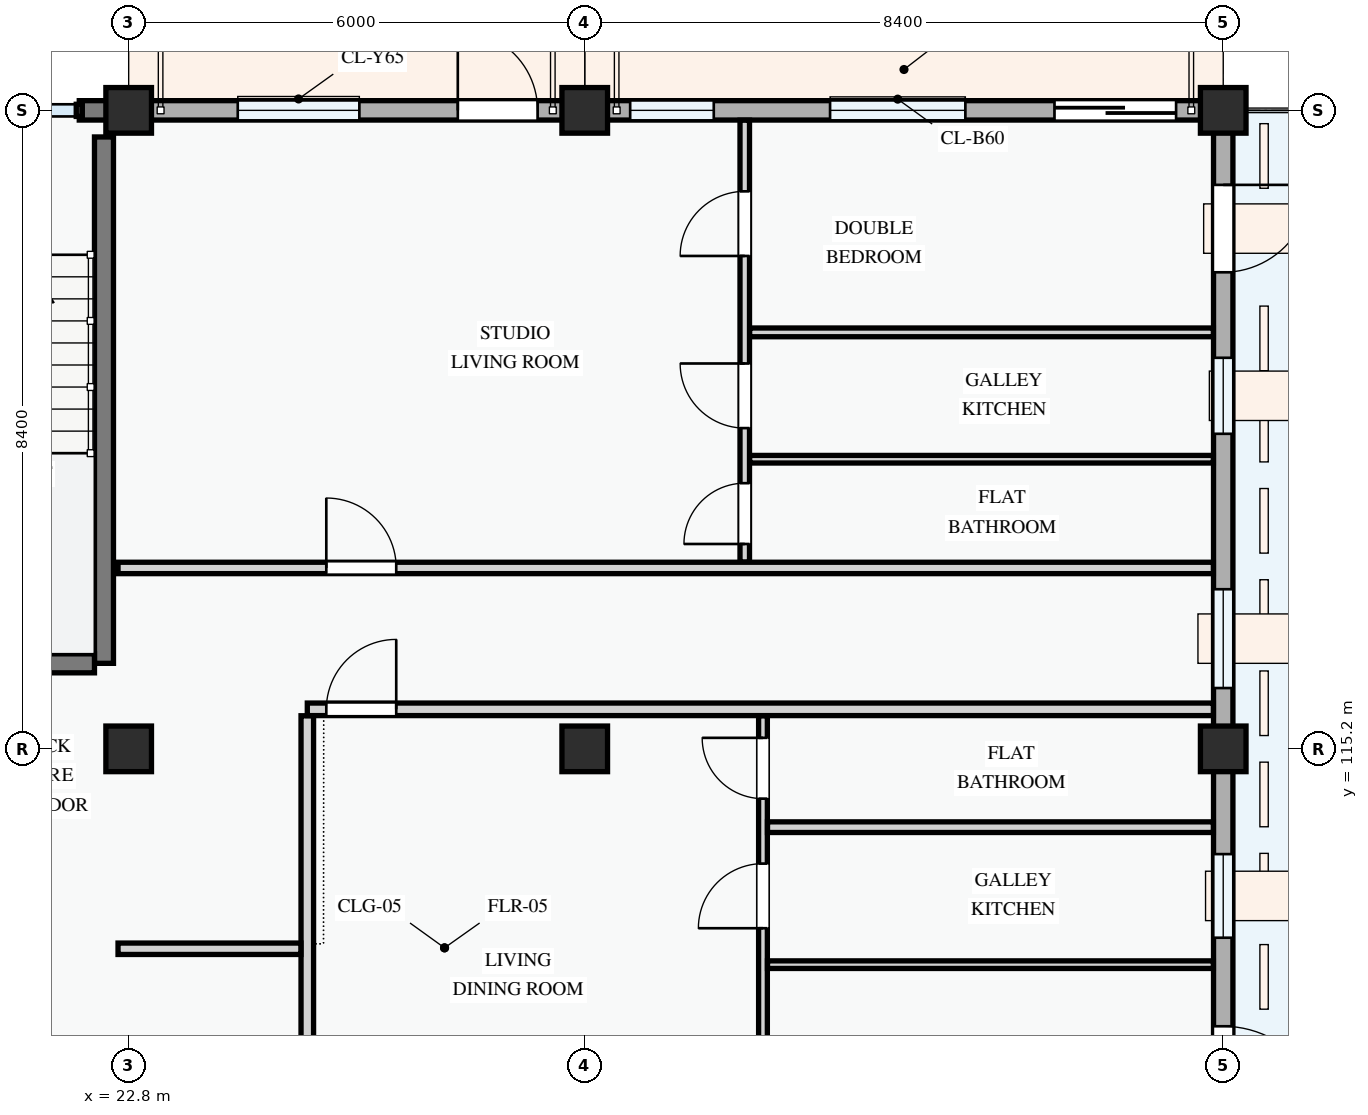
"""IFC4 building model, lengths in metres.
Left out: names, types, materials, properties, quantities, classifications, styles, units other than length and angle.
Written with IfcOpenShell. Run it as: python <this file> out.ifc"""

import sys

from ifc_helpers import new_model, si_unit, direction, frame, frame_2d, origin, origin_2d, place, context, subcontext, project, spatial, rectangle, extrude, element, fill, save


model = new_model("IFC4")
c1 = context("Model", 3, precision=1e-05, world=origin(), true_north=direction((0.0, 1.0)))
c2 = subcontext(c1, "Body", "Model", "MODEL_VIEW")
j1 = project(units=[si_unit("LENGTHUNIT", "METRE"), si_unit("PLANEANGLEUNIT", "RADIAN")], contexts=[c1])
p1 = place(None, origin())
s1 = spatial("IfcSite", under=j1, at=p1, CompositionType="ELEMENT")
p2 = place(p1, origin())
s2 = spatial("IfcBuilding", under=s1, at=p2, CompositionType="ELEMENT")
p3 = place(p2, frame((0.0, 0.0, 37.8)))
s3 = spatial("IfcBuildingStorey", under=s2, at=p3, CompositionType="ELEMENT", Elevation=37.8)
for number, where, z_axis, x_axis in (
    (1, (22.8, 115.2, 0.0), (0.0, 0.0, 1.0), (1.0, 0.0, 0.0)),
    (2, (22.8, 123.6, 0.0), (0.0, 0.0, 1.0), (1.0, 0.0, 0.0)),
    (3, (28.8, 115.2, 0.0), (0.0, 0.0, 1.0), (1.0, 0.0, 0.0)),
    (4, (28.8, 123.6, 0.0), (0.0, 0.0, 1.0), (1.0, 0.0, 0.0)),
    (5, (37.2, 115.2, 0.0), (0.0, 0.0, 1.0), (1.0, 0.0, 0.0)),
    (6, (37.2, 123.6, 0.0), (0.0, 0.0, 1.0), (1.0, 0.0, 0.0)),
):
    element("IfcColumn", number, at=place(p3, frame(where, z_axis=z_axis, x_axis=x_axis)), inside=s3, PredefinedType="COLUMN", context=c2, shape_type="SweptSolid", body=[
        extrude(rectangle(XDim=0.6, YDim=0.6, at=origin_2d()), origin(), (0.0, 0.0, 1.0), 3.3),
    ])
p4 = place(p3, frame((37.2, 109.2, 0.0), z_axis=(0.0, 0.0, 1.0), x_axis=(0.0, 1.0, 0.0)))
e7 = element("IfcWall", 7, at=p4, inside=s3, PredefinedType="STANDARD", context=c2, shape_type="SweptSolid", body=[
    extrude(rectangle(XDim=6.0, YDim=0.255, at=frame_2d((3.0, 0.0))), origin(), (0.0, 0.0, 1.0), 2.575),
])
p5 = place(p4, frame((1.0, 0.0, 0.0)))
e8 = element("IfcOpeningElement", 8, at=p5, cuts=e7, PredefinedType="OPENING", context=c2, shape_type="SweptSolid", body=[
    extrude(rectangle(XDim=1.35, YDim=2.2, at=frame_2d((0.675, 1.1))), frame((0.0, 0.137, 0.0), z_axis=(0.0, -1.0, 0.0), x_axis=(1.0, 0.0, 0.0)), (0.0, 0.0, 1.0), 0.275),
])
p6 = place(p4, frame((3.515, 0.0, 0.78)))
e9 = element("IfcOpeningElement", 9, at=p6, cuts=e7, PredefinedType="OPENING", context=c2, shape_type="SweptSolid", body=[
    extrude(rectangle(XDim=1.1, YDim=1.3, at=frame_2d((0.55, 0.65))), frame((0.0, 0.137, 0.0), z_axis=(0.0, -1.0, 0.0), x_axis=(1.0, 0.0, 0.0)), (0.0, 0.0, 1.0), 0.275),
])
p7 = place(p3, frame((37.2, 115.2, 0.0), z_axis=(0.0, 0.0, 1.0), x_axis=(0.0, 1.0, 0.0)))
e10 = element("IfcWall", 10, at=p7, inside=s3, PredefinedType="STANDARD", context=c2, shape_type="SweptSolid", body=[
    extrude(rectangle(XDim=8.4, YDim=0.255, at=frame_2d((4.2, 0.0))), origin(), (0.0, 0.0, 1.0), 2.425),
])
p8 = place(p7, frame((6.27, 0.0, 0.0)))
e11 = element("IfcOpeningElement", 11, at=p8, cuts=e10, PredefinedType="OPENING", context=c2, shape_type="SweptSolid", body=[
    extrude(rectangle(XDim=1.15, YDim=2.15, at=frame_2d((0.575, 1.075))), frame((0.0, 0.137, 0.0), z_axis=(0.0, -1.0, 0.0), x_axis=(1.0, 0.0, 0.0)), (0.0, 0.0, 1.0), 0.275),
])
p9 = place(p7, frame((0.8, 0.0, 0.78)))
e12 = element("IfcOpeningElement", 12, at=p9, cuts=e10, PredefinedType="OPENING", context=c2, shape_type="SweptSolid", body=[
    extrude(rectangle(XDim=1.3, YDim=1.4, at=frame_2d((0.65, 0.7))), frame((0.0, 0.137, 0.0), z_axis=(0.0, -1.0, 0.0), x_axis=(1.0, 0.0, 0.0)), (0.0, 0.0, 1.0), 0.275),
])
p10 = place(p7, frame((4.145, 0.0, 0.78)))
e13 = element("IfcOpeningElement", 13, at=p10, cuts=e10, PredefinedType="OPENING", context=c2, shape_type="SweptSolid", body=[
    extrude(rectangle(XDim=1.0, YDim=1.25, at=frame_2d((0.5, 0.625))), frame((0.0, 0.137, 0.0), z_axis=(0.0, -1.0, 0.0), x_axis=(1.0, 0.0, 0.0)), (0.0, 0.0, 1.0), 0.275),
])
p11 = place(p3, frame((37.2, 123.6, 0.0), z_axis=(0.0, 0.0, 1.0), x_axis=(-1.0, 0.0, 0.0)))
e14 = element("IfcWall", 14, at=p11, inside=s3, PredefinedType="STANDARD", context=c2, shape_type="SweptSolid", body=[
    extrude(rectangle(XDim=8.4, YDim=0.255, at=frame_2d((4.2, 0.0))), origin(), (0.0, 0.0, 1.0), 2.375),
])
p12 = place(p11, frame((0.62, 0.0, 0.0)))
e15 = element("IfcOpeningElement", 15, at=p12, cuts=e14, PredefinedType="OPENING", context=c2, shape_type="SweptSolid", body=[
    extrude(rectangle(XDim=1.6, YDim=2.2, at=frame_2d((0.8, 1.1))), frame((0.0, 0.137, 0.0), z_axis=(0.0, -1.0, 0.0), x_axis=(1.0, 0.0, 0.0)), (0.0, 0.0, 1.0), 0.275),
])
p13 = place(p11, frame((3.392, 0.0, 0.78)))
e16 = element("IfcOpeningElement", 16, at=p13, cuts=e14, PredefinedType="OPENING", context=c2, shape_type="SweptSolid", body=[
    extrude(rectangle(XDim=1.78, YDim=1.42, at=frame_2d((0.89, 0.71))), frame((0.0, 0.137, 0.0), z_axis=(0.0, -1.0, 0.0), x_axis=(1.0, 0.0, 0.0)), (0.0, 0.0, 1.0), 0.275),
])
p14 = place(p11, frame((6.702, 0.0, 0.78)))
e17 = element("IfcOpeningElement", 17, at=p14, cuts=e14, PredefinedType="OPENING", context=c2, shape_type="SweptSolid", body=[
    extrude(rectangle(XDim=1.1, YDim=1.3, at=frame_2d((0.55, 0.65))), frame((0.0, 0.137, 0.0), z_axis=(0.0, -1.0, 0.0), x_axis=(1.0, 0.0, 0.0)), (0.0, 0.0, 1.0), 0.275),
])
p15 = place(p3, frame((28.8, 123.6, 0.0), z_axis=(0.0, 0.0, 1.0), x_axis=(-1.0, 0.0, 0.0)))
e18 = element("IfcWall", 18, at=p15, inside=s3, PredefinedType="STANDARD", context=c2, shape_type="SweptSolid", body=[
    extrude(rectangle(XDim=6.0, YDim=0.255, at=frame_2d((3.0, 0.0))), origin(), (0.0, 0.0, 1.0), 2.525),
])
p16 = place(p15, frame((0.62, 0.0, 0.0)))
e19 = element("IfcOpeningElement", 19, at=p16, cuts=e18, PredefinedType="OPENING", context=c2, shape_type="SweptSolid", body=[
    extrude(rectangle(XDim=1.05, YDim=2.15, at=frame_2d((0.525, 1.075))), frame((0.0, 0.137, 0.0), z_axis=(0.0, -1.0, 0.0), x_axis=(1.0, 0.0, 0.0)), (0.0, 0.0, 1.0), 0.275),
])
p17 = place(p15, frame((2.965, 0.0, 0.78)))
e20 = element("IfcOpeningElement", 20, at=p17, cuts=e18, PredefinedType="OPENING", context=c2, shape_type="SweptSolid", body=[
    extrude(rectangle(XDim=1.6, YDim=1.55, at=frame_2d((0.8, 0.775))), frame((0.0, 0.137, 0.0), z_axis=(0.0, -1.0, 0.0), x_axis=(1.0, 0.0, 0.0)), (0.0, 0.0, 1.0), 0.275),
])
p18 = place(p3, frame((22.8, 123.6, 0.0), z_axis=(0.0, 0.0, 1.0), x_axis=(-1.0, 0.0, 0.0)))
e21 = element("IfcWall", 21, at=p18, inside=s3, PredefinedType="STANDARD", context=c2, shape_type="SweptSolid", body=[
    extrude(rectangle(XDim=0.65, YDim=0.255, at=frame_2d((0.325, 0.0))), origin(), (0.0, 0.0, 1.0), 3.04),
])
p19 = place(p3, frame((22.475, 123.25, 0.0), z_axis=(0.0, 0.0, 1.0), x_axis=(0.0, -1.0, 0.0)))
e22 = element("IfcWall", 22, at=p19, inside=s3, PredefinedType="SHEAR", context=c2, shape_type="SweptSolid", body=[
    extrude(rectangle(XDim=6.925, YDim=0.25, at=frame_2d((3.462, 0.0))), origin(), (0.0, 0.0, 1.0), 3.0),
])
p20 = place(p3, frame((8.85, 116.325, 0.0), z_axis=(0.0, 0.0, 1.0), x_axis=(1.0, 0.0, 0.0)))
e23 = element("IfcWall", 23, at=p20, inside=s3, PredefinedType="SHEAR", context=c2, shape_type="SweptSolid", body=[
    extrude(rectangle(XDim=13.5, YDim=0.25, at=frame_2d((6.75, 0.0))), origin(), (0.0, 0.0, 1.0), 3.0),
])
p21 = place(p20, frame((6.2, 0.0, 0.0)))
e24 = element("IfcOpeningElement", 24, at=p21, cuts=e23, PredefinedType="OPENING", context=c2, shape_type="SweptSolid", body=[
    extrude(rectangle(XDim=1.1, YDim=2.15, at=frame_2d((0.55, 1.075))), frame((0.0, 0.135, 0.0), z_axis=(0.0, -1.0, 0.0), x_axis=(1.0, 0.0, 0.0)), (0.0, 0.0, 1.0), 0.27),
])
p22 = place(p3, frame((25.15, 109.33, 0.0), z_axis=(0.0, 0.0, 1.0), x_axis=(0.0, 1.0, 0.0)))
e25 = element("IfcWall", 25, at=p22, inside=s3, PredefinedType="PARTITIONING", context=c2, shape_type="SweptSolid", body=[
    extrude(rectangle(XDim=6.306, YDim=0.165, at=frame_2d((3.153, 0.0))), origin(), (0.0, 0.0, 1.0), 3.0),
])
p23 = place(p3, frame((22.66, 112.57, 0.0), z_axis=(0.0, 0.0, 1.0), x_axis=(1.0, 0.0, 0.0)))
e26 = element("IfcWall", 26, at=p23, inside=s3, PredefinedType="PARTITIONING", context=c2, shape_type="SweptSolid", body=[
    extrude(rectangle(XDim=2.406, YDim=0.15, at=frame_2d((1.203, 0.0))), origin(), (0.0, 0.0, 1.0), 3.0),
])
p24 = place(p3, frame((31.145, 109.26, 0.0), z_axis=(0.0, 0.0, 1.0), x_axis=(0.0, 1.0, 0.0)))
e27 = element("IfcWall", 27, at=p24, inside=s3, PredefinedType="PARTITIONING", context=c2, shape_type="SweptSolid", body=[
    extrude(rectangle(XDim=6.375, YDim=0.115, at=frame_2d((3.188, 0.0))), origin(), (0.0, 0.0, 1.0), 3.0),
])
p25 = place(p24, frame((1.125, 0.0, 0.0)))
e28 = element("IfcOpeningElement", 28, at=p25, cuts=e27, PredefinedType="OPENING", context=c2, shape_type="SweptSolid", body=[
    extrude(rectangle(XDim=0.85, YDim=2.1, at=frame_2d((0.425, 1.05))), frame((0.0, 0.067, 0.0), z_axis=(0.0, -1.0, 0.0), x_axis=(1.0, 0.0, 0.0)), (0.0, 0.0, 1.0), 0.135),
])
p26 = place(p24, frame((3.58, 0.0, 0.0)))
e29 = element("IfcOpeningElement", 29, at=p26, cuts=e27, PredefinedType="OPENING", context=c2, shape_type="SweptSolid", body=[
    extrude(rectangle(XDim=0.85, YDim=2.1, at=frame_2d((0.425, 1.05))), frame((0.0, 0.067, 0.0), z_axis=(0.0, -1.0, 0.0), x_axis=(1.0, 0.0, 0.0)), (0.0, 0.0, 1.0), 0.135),
])
p27 = place(p24, frame((5.285, 0.0, 0.0)))
e30 = element("IfcOpeningElement", 30, at=p27, cuts=e27, PredefinedType="OPENING", context=c2, shape_type="SweptSolid", body=[
    extrude(rectangle(XDim=0.8, YDim=2.1, at=frame_2d((0.4, 1.05))), frame((0.0, 0.067, 0.0), z_axis=(0.0, -1.0, 0.0), x_axis=(1.0, 0.0, 0.0)), (0.0, 0.0, 1.0), 0.135),
])
p28 = place(p3, frame((31.205, 112.361, 0.0), z_axis=(0.0, 0.0, 1.0), x_axis=(1.0, 0.0, 0.0)))
e31 = element("IfcWall", 31, at=p28, inside=s3, PredefinedType="PARTITIONING", context=c2, shape_type="SweptSolid", body=[
    extrude(rectangle(XDim=5.866, YDim=0.1, at=frame_2d((2.933, 0.0))), origin(), (0.0, 0.0, 1.0), 3.0),
])
p29 = place(p3, frame((31.205, 114.17, 0.0), z_axis=(0.0, 0.0, 1.0), x_axis=(1.0, 0.0, 0.0)))
e32 = element("IfcWall", 32, at=p29, inside=s3, PredefinedType="PARTITIONING", context=c2, shape_type="SweptSolid", body=[
    extrude(rectangle(XDim=5.866, YDim=0.14, at=frame_2d((2.933, 0.0))), origin(), (0.0, 0.0, 1.0), 3.0),
])
p30 = place(p3, frame((30.905, 117.657, 0.0), z_axis=(0.0, 0.0, 1.0), x_axis=(0.0, 1.0, 0.0)))
e33 = element("IfcWall", 33, at=p30, inside=s3, PredefinedType="PARTITIONING", context=c2, shape_type="SweptSolid", body=[
    extrude(rectangle(XDim=5.813, YDim=0.125, at=frame_2d((2.907, 0.0))), origin(), (0.0, 0.0, 1.0), 3.0),
])
p31 = place(p30, frame((0.238, 0.0, 0.0)))
e34 = element("IfcOpeningElement", 34, at=p31, cuts=e33, PredefinedType="OPENING", context=c2, shape_type="SweptSolid", body=[
    extrude(rectangle(XDim=0.8, YDim=2.1, at=frame_2d((0.4, 1.05))), frame((0.0, 0.073, 0.0), z_axis=(0.0, -1.0, 0.0), x_axis=(1.0, 0.0, 0.0)), (0.0, 0.0, 1.0), 0.145),
])
p32 = place(p30, frame((1.763, 0.0, 0.0)))
e35 = element("IfcOpeningElement", 35, at=p32, cuts=e33, PredefinedType="OPENING", context=c2, shape_type="SweptSolid", body=[
    extrude(rectangle(XDim=0.85, YDim=2.1, at=frame_2d((0.425, 1.05))), frame((0.0, 0.073, 0.0), z_axis=(0.0, -1.0, 0.0), x_axis=(1.0, 0.0, 0.0)), (0.0, 0.0, 1.0), 0.145),
])
p33 = place(p30, frame((4.028, 0.0, 0.0)))
e36 = element("IfcOpeningElement", 36, at=p33, cuts=e33, PredefinedType="OPENING", context=c2, shape_type="SweptSolid", body=[
    extrude(rectangle(XDim=0.85, YDim=2.1, at=frame_2d((0.425, 1.05))), frame((0.0, 0.073, 0.0), z_axis=(0.0, -1.0, 0.0), x_axis=(1.0, 0.0, 0.0)), (0.0, 0.0, 1.0), 0.145),
])
p34 = place(p3, frame((30.97, 120.679, 0.0), z_axis=(0.0, 0.0, 1.0), x_axis=(1.0, 0.0, 0.0)))
e37 = element("IfcWall", 37, at=p34, inside=s3, PredefinedType="PARTITIONING", context=c2, shape_type="SweptSolid", body=[
    extrude(rectangle(XDim=6.101, YDim=0.115, at=frame_2d((3.05, 0.0))), origin(), (0.0, 0.0, 1.0), 3.0),
])
p35 = place(p3, frame((30.97, 119.01, 0.0), z_axis=(0.0, 0.0, 1.0), x_axis=(1.0, 0.0, 0.0)))
e38 = element("IfcWall", 38, at=p35, inside=s3, PredefinedType="PARTITIONING", context=c2, shape_type="SweptSolid", body=[
    extrude(rectangle(XDim=6.101, YDim=0.1, at=frame_2d((3.05, 0.0))), origin(), (0.0, 0.0, 1.0), 3.0),
])
p36 = place(p3, frame((25.15, 115.72, 0.0), z_axis=(0.0, 0.0, 1.0), x_axis=(1.0, 0.0, 0.0)))
e39 = element("IfcWall", 39, at=p36, inside=s3, PredefinedType="PARTITIONING", context=c2, shape_type="SweptSolid", body=[
    extrude(rectangle(XDim=11.921, YDim=0.165, at=frame_2d((5.96, 0.0))), origin(), (0.0, 0.0, 1.0), 3.0),
])
p37 = place(p36, frame((0.25, 0.0, 0.0)))
e40 = element("IfcOpeningElement", 40, at=p37, cuts=e39, PredefinedType="OPENING", context=c2, shape_type="SweptSolid", body=[
    extrude(rectangle(XDim=0.92, YDim=2.1, at=frame_2d((0.46, 1.05))), frame((0.0, 0.093, 0.0), z_axis=(0.0, -1.0, 0.0), x_axis=(1.0, 0.0, 0.0)), (0.0, 0.0, 1.0), 0.185),
])
p38 = place(p3, frame((22.66, 117.58, 0.0), z_axis=(0.0, 0.0, 1.0), x_axis=(1.0, 0.0, 0.0)))
e41 = element("IfcWall", 41, at=p38, inside=s3, PredefinedType="PARTITIONING", context=c2, shape_type="SweptSolid", body=[
    extrude(rectangle(XDim=14.411, YDim=0.15, at=frame_2d((7.205, 0.0))), origin(), (0.0, 0.0, 1.0), 3.0),
])
p39 = place(p38, frame((2.74, 0.0, 0.0)))
e42 = element("IfcOpeningElement", 42, at=p39, cuts=e41, PredefinedType="OPENING", context=c2, shape_type="SweptSolid", body=[
    extrude(rectangle(XDim=0.92, YDim=2.1, at=frame_2d((0.46, 1.05))), frame((0.0, 0.085, 0.0), z_axis=(0.0, -1.0, 0.0), x_axis=(1.0, 0.0, 0.0)), (0.0, 0.0, 1.0), 0.17),
])
p40 = place(p5, frame((1.35, 0.0, 0.0), z_axis=(0.0, 0.0, 1.0), x_axis=(-1.0, 0.0, 0.0)))
e43 = element("IfcDoor", 43, at=p40, inside=s3, OperationType="SINGLE_SWING_RIGHT", PredefinedType="DOOR", context=c2, shape_type="SweptSolid", body=[
    extrude(rectangle(XDim=1.35, YDim=2.2, at=frame_2d((0.675, 1.1))), frame((0.0, 0.025, 0.0), z_axis=(0.0, -1.0, 0.0), x_axis=(1.0, 0.0, 0.0)), (0.0, 0.0, 1.0), 0.05),
])
fill(e8, e43)
p41 = place(p6, origin())
e44 = element("IfcWindow", 44, at=p41, inside=s3, PartitioningType="SINGLE_PANEL", PredefinedType="WINDOW", context=c2, shape_type="SweptSolid", body=[
    extrude(rectangle(XDim=1.1, YDim=1.3, at=frame_2d((0.55, 0.65))), frame((0.0, 0.03, 0.0), z_axis=(0.0, -1.0, 0.0), x_axis=(1.0, 0.0, 0.0)), (0.0, 0.0, 1.0), 0.06),
])
fill(e9, e44)
p42 = place(p8, frame((1.15, 0.0, 0.0), z_axis=(0.0, 0.0, 1.0), x_axis=(-1.0, 0.0, 0.0)))
e45 = element("IfcDoor", 45, at=p42, inside=s3, OperationType="SINGLE_SWING_LEFT", PredefinedType="DOOR", context=c2, shape_type="SweptSolid", body=[
    extrude(rectangle(XDim=1.15, YDim=2.15, at=frame_2d((0.575, 1.075))), frame((0.0, 0.025, 0.0), z_axis=(0.0, -1.0, 0.0), x_axis=(1.0, 0.0, 0.0)), (0.0, 0.0, 1.0), 0.05),
])
fill(e11, e45)
p43 = place(p9, origin())
e46 = element("IfcWindow", 46, at=p43, inside=s3, PartitioningType="SINGLE_PANEL", PredefinedType="WINDOW", context=c2, shape_type="SweptSolid", body=[
    extrude(rectangle(XDim=1.3, YDim=1.4, at=frame_2d((0.65, 0.7))), frame((0.0, 0.03, 0.0), z_axis=(0.0, -1.0, 0.0), x_axis=(1.0, 0.0, 0.0)), (0.0, 0.0, 1.0), 0.06),
])
fill(e12, e46)
p44 = place(p10, origin())
e47 = element("IfcWindow", 47, at=p44, inside=s3, PartitioningType="SINGLE_PANEL", PredefinedType="WINDOW", context=c2, shape_type="SweptSolid", body=[
    extrude(rectangle(XDim=1.0, YDim=1.25, at=frame_2d((0.5, 0.625))), frame((0.0, 0.03, 0.0), z_axis=(0.0, -1.0, 0.0), x_axis=(1.0, 0.0, 0.0)), (0.0, 0.0, 1.0), 0.06),
])
fill(e13, e47)
p45 = place(p12, frame((1.6, 0.0, 0.0), z_axis=(0.0, 0.0, 1.0), x_axis=(-1.0, 0.0, 0.0)))
e48 = element("IfcDoor", 48, at=p45, inside=s3, OperationType="SLIDING_TO_LEFT", PredefinedType="DOOR", context=c2, shape_type="SweptSolid", body=[
    extrude(rectangle(XDim=1.6, YDim=2.2, at=frame_2d((0.8, 1.1))), frame((0.0, 0.025, 0.0), z_axis=(0.0, -1.0, 0.0), x_axis=(1.0, 0.0, 0.0)), (0.0, 0.0, 1.0), 0.05),
])
fill(e15, e48)
p46 = place(p13, origin())
e49 = element("IfcWindow", 49, at=p46, inside=s3, PartitioningType="DOUBLE_PANEL_VERTICAL", PredefinedType="WINDOW", context=c2, shape_type="SweptSolid", body=[
    extrude(rectangle(XDim=1.78, YDim=1.42, at=frame_2d((0.89, 0.71))), frame((0.0, 0.03, 0.0), z_axis=(0.0, -1.0, 0.0), x_axis=(1.0, 0.0, 0.0)), (0.0, 0.0, 1.0), 0.06),
])
fill(e16, e49)
p47 = place(p14, origin())
e50 = element("IfcWindow", 50, at=p47, inside=s3, PartitioningType="SINGLE_PANEL", PredefinedType="WINDOW", context=c2, shape_type="SweptSolid", body=[
    extrude(rectangle(XDim=1.1, YDim=1.3, at=frame_2d((0.55, 0.65))), frame((0.0, 0.03, 0.0), z_axis=(0.0, -1.0, 0.0), x_axis=(1.0, 0.0, 0.0)), (0.0, 0.0, 1.0), 0.06),
])
fill(e17, e50)
p48 = place(p16, frame((1.05, 0.0, 0.0), z_axis=(0.0, 0.0, 1.0), x_axis=(-1.0, 0.0, 0.0)))
e51 = element("IfcDoor", 51, at=p48, inside=s3, OperationType="SINGLE_SWING_LEFT", PredefinedType="DOOR", context=c2, shape_type="SweptSolid", body=[
    extrude(rectangle(XDim=1.05, YDim=2.15, at=frame_2d((0.525, 1.075))), frame((0.0, 0.025, 0.0), z_axis=(0.0, -1.0, 0.0), x_axis=(1.0, 0.0, 0.0)), (0.0, 0.0, 1.0), 0.05),
])
fill(e19, e51)
p49 = place(p17, origin())
e52 = element("IfcWindow", 52, at=p49, inside=s3, PartitioningType="DOUBLE_PANEL_VERTICAL", PredefinedType="WINDOW", context=c2, shape_type="SweptSolid", body=[
    extrude(rectangle(XDim=1.6, YDim=1.55, at=frame_2d((0.8, 0.775))), frame((0.0, 0.03, 0.0), z_axis=(0.0, -1.0, 0.0), x_axis=(1.0, 0.0, 0.0)), (0.0, 0.0, 1.0), 0.06),
])
fill(e20, e52)
p50 = place(p26, origin())
e53 = element("IfcDoor", 53, at=p50, inside=s3, OperationType="SINGLE_SWING_LEFT", PredefinedType="DOOR", context=c2, shape_type="SweptSolid", body=[
    extrude(rectangle(XDim=0.85, YDim=2.1, at=frame_2d((0.425, 1.05))), frame((0.0, 0.025, 0.0), z_axis=(0.0, -1.0, 0.0), x_axis=(1.0, 0.0, 0.0)), (0.0, 0.0, 1.0), 0.05),
])
fill(e29, e53)
p51 = place(p27, origin())
e54 = element("IfcDoor", 54, at=p51, inside=s3, OperationType="SINGLE_SWING_RIGHT", PredefinedType="DOOR", context=c2, shape_type="SweptSolid", body=[
    extrude(rectangle(XDim=0.8, YDim=2.1, at=frame_2d((0.4, 1.05))), frame((0.0, 0.025, 0.0), z_axis=(0.0, -1.0, 0.0), x_axis=(1.0, 0.0, 0.0)), (0.0, 0.0, 1.0), 0.05),
])
fill(e30, e54)
p52 = place(p31, origin())
e55 = element("IfcDoor", 55, at=p52, inside=s3, OperationType="SINGLE_SWING_LEFT", PredefinedType="DOOR", context=c2, shape_type="SweptSolid", body=[
    extrude(rectangle(XDim=0.8, YDim=2.1, at=frame_2d((0.4, 1.05))), frame((0.0, 0.025, 0.0), z_axis=(0.0, -1.0, 0.0), x_axis=(1.0, 0.0, 0.0)), (0.0, 0.0, 1.0), 0.05),
])
fill(e34, e55)
p53 = place(p32, origin())
e56 = element("IfcDoor", 56, at=p53, inside=s3, OperationType="SINGLE_SWING_RIGHT", PredefinedType="DOOR", context=c2, shape_type="SweptSolid", body=[
    extrude(rectangle(XDim=0.85, YDim=2.1, at=frame_2d((0.425, 1.05))), frame((0.0, 0.025, 0.0), z_axis=(0.0, -1.0, 0.0), x_axis=(1.0, 0.0, 0.0)), (0.0, 0.0, 1.0), 0.05),
])
fill(e35, e56)
p54 = place(p33, origin())
e57 = element("IfcDoor", 57, at=p54, inside=s3, OperationType="SINGLE_SWING_LEFT", PredefinedType="DOOR", context=c2, shape_type="SweptSolid", body=[
    extrude(rectangle(XDim=0.85, YDim=2.1, at=frame_2d((0.425, 1.05))), frame((0.0, 0.025, 0.0), z_axis=(0.0, -1.0, 0.0), x_axis=(1.0, 0.0, 0.0)), (0.0, 0.0, 1.0), 0.05),
])
fill(e36, e57)
p55 = place(p37, origin())
e58 = element("IfcDoor", 58, at=p55, inside=s3, OperationType="SINGLE_SWING_RIGHT", PredefinedType="DOOR", context=c2, shape_type="SweptSolid", body=[
    extrude(rectangle(XDim=0.92, YDim=2.1, at=frame_2d((0.46, 1.05))), frame((0.0, 0.025, 0.0), z_axis=(0.0, -1.0, 0.0), x_axis=(1.0, 0.0, 0.0)), (0.0, 0.0, 1.0), 0.05),
])
fill(e40, e58)
p56 = place(p39, origin())
e59 = element("IfcDoor", 59, at=p56, inside=s3, OperationType="SINGLE_SWING_LEFT", PredefinedType="DOOR", context=c2, shape_type="SweptSolid", body=[
    extrude(rectangle(XDim=0.92, YDim=2.1, at=frame_2d((0.46, 1.05))), frame((0.0, 0.025, 0.0), z_axis=(0.0, -1.0, 0.0), x_axis=(1.0, 0.0, 0.0)), (0.0, 0.0, 1.0), 0.05),
])
fill(e42, e59)
save(model, sys.argv[1])
